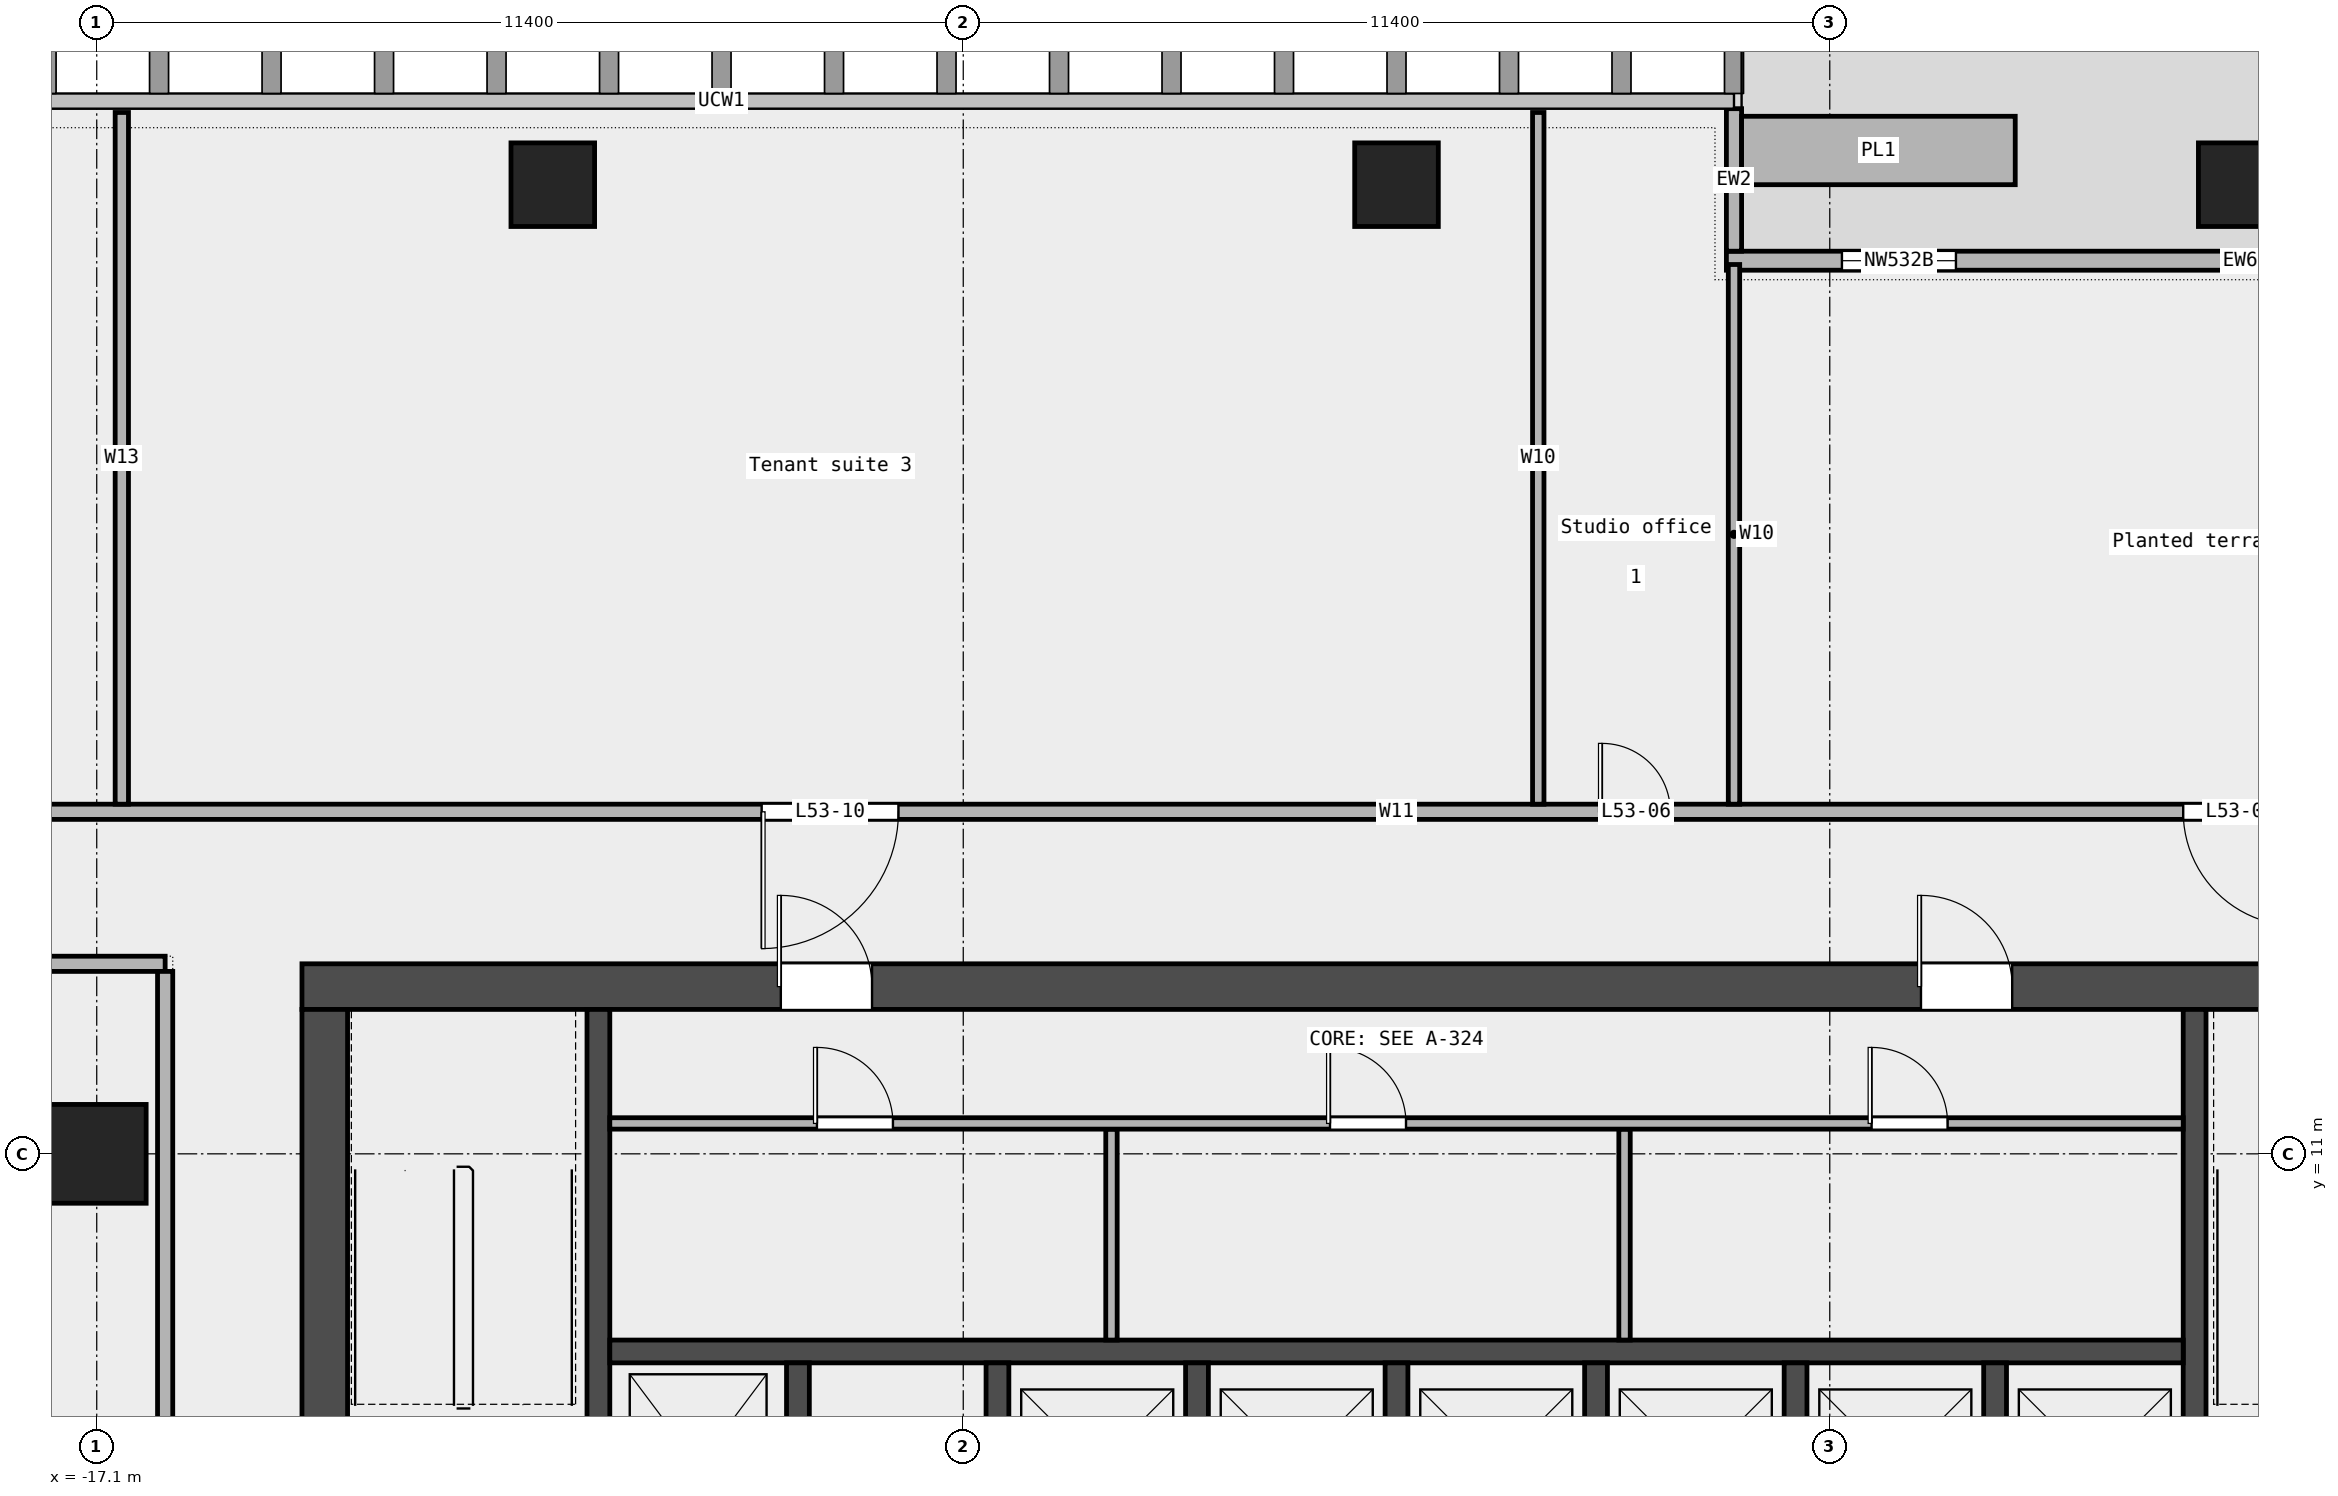
"""IFC4 building model, lengths in metres.
Left out: names, types, materials, properties, quantities, classifications, styles, units other than length and angle.
Written with IfcOpenShell. Run it as: python <this file> out.ifc"""

import sys

from ifc_helpers import new_model, si_unit, direction, frame, frame_2d, origin, origin_2d, place, context, subcontext, project, spatial, rectangle, extrude, element, fill, save


model = new_model("IFC4")
c1 = context("Model", 3, precision=1e-05, world=origin(), true_north=direction((0.0, 1.0)))
c2 = subcontext(c1, "Body", "Model", "MODEL_VIEW")
j1 = project(units=[si_unit("LENGTHUNIT", "METRE"), si_unit("PLANEANGLEUNIT", "RADIAN")], contexts=[c1])
p1 = place(None, origin())
s1 = spatial("IfcSite", under=j1, at=p1, CompositionType="ELEMENT")
p2 = place(p1, origin())
s2 = spatial("IfcBuilding", under=s1, at=p2, CompositionType="ELEMENT")
p3 = place(p2, frame((0.0, 0.0, 247.0)))
s3 = spatial("IfcBuildingStorey", under=s2, at=p3, CompositionType="ELEMENT", Elevation=247.0)
for number, where, z_axis, x_axis in (
    (1, (11.1, 23.75, 0.0), (0.0, 0.0, 1.0), (1.0, 0.0, 0.0)),
    (2, (0.0, 23.75, 0.0), (0.0, 0.0, 1.0), (1.0, 0.0, 0.0)),
    (3, (-11.1, 23.75, 0.0), (0.0, 0.0, 1.0), (1.0, 0.0, 0.0)),
):
    element("IfcColumn", number, at=place(p3, frame(where, z_axis=z_axis, x_axis=x_axis)), inside=s3, PredefinedType="COLUMN", context=c2, shape_type="SweptSolid", body=[
        extrude(rectangle(XDim=1.1, YDim=1.1, at=origin_2d()), origin(), (0.0, 0.0, 1.0), 3.6),
    ])
p4 = place(p3, frame((-17.1, 11.0, 0.0), z_axis=(0.0, 0.0, 1.0), x_axis=(1.0, 0.0, 0.0)))
e4 = element("IfcColumn", 4, at=p4, inside=s3, PredefinedType="COLUMN", context=c2, shape_type="SweptSolid", body=[
    extrude(rectangle(XDim=1.3, YDim=1.3, at=origin_2d()), origin(), (0.0, 0.0, 1.0), 3.6),
])
p5 = place(p3, frame((17.86, 22.75, 0.0), z_axis=(0.0, 0.0, 1.0), x_axis=(-1.0, 0.0, 0.0)))
e5 = element("IfcWall", 5, at=p5, inside=s3, PredefinedType="STANDARD", context=c2, shape_type="SweptSolid", body=[
    extrude(rectangle(XDim=13.52, YDim=0.25, at=frame_2d((6.76, 0.0))), origin(), (0.0, 0.0, 1.0), 3.6),
])
p6 = place(p5, frame((1.5, 0.0, 0.45)))
e6 = element("IfcOpeningElement", 6, at=p6, cuts=e5, PredefinedType="OPENING", context=c2, shape_type="SweptSolid", body=[
    extrude(rectangle(XDim=1.5, YDim=2.4, at=frame_2d((0.75, 1.2))), frame((0.0, 0.137, 0.0), z_axis=(0.0, -1.0, 0.0), x_axis=(1.0, 0.0, 0.0)), (0.0, 0.0, 1.0), 0.274),
])
p7 = place(p5, frame((4.0, 0.0, 0.0)))
e7 = element("IfcOpeningElement", 7, at=p7, cuts=e5, PredefinedType="OPENING", context=c2, shape_type="SweptSolid", body=[
    extrude(rectangle(XDim=1.8, YDim=2.4, at=frame_2d((0.9, 1.2))), frame((0.0, 0.137, 0.0), z_axis=(0.0, -1.0, 0.0), x_axis=(1.0, 0.0, 0.0)), (0.0, 0.0, 1.0), 0.274),
])
p8 = place(p5, frame((10.5, 0.0, 0.45)))
e8 = element("IfcOpeningElement", 8, at=p8, cuts=e5, PredefinedType="OPENING", context=c2, shape_type="SweptSolid", body=[
    extrude(rectangle(XDim=1.5, YDim=2.4, at=frame_2d((0.75, 1.2))), frame((0.0, 0.137, 0.0), z_axis=(0.0, -1.0, 0.0), x_axis=(1.0, 0.0, 0.0)), (0.0, 0.0, 1.0), 0.274),
])
p9 = place(p3, frame((4.44, 24.75, 0.0), z_axis=(0.0, 0.0, 1.0), x_axis=(0.0, -1.0, 0.0)))
e9 = element("IfcWall", 9, at=p9, inside=s3, PredefinedType="STANDARD", context=c2, shape_type="SweptSolid", body=[
    extrude(rectangle(XDim=1.875, YDim=0.2, at=frame_2d((0.938, 0.0))), origin(), (0.0, 0.0, 1.0), 3.6),
])
p10 = place(p3, frame((8.14, 24.2, 0.0), z_axis=(0.0, 0.0, 1.0), x_axis=(-1.0, 0.0, 0.0)))
e10 = element("IfcWall", 10, at=p10, inside=s3, PredefinedType="STANDARD", context=c2, shape_type="SweptSolid", body=[
    extrude(rectangle(XDim=3.6, YDim=0.9, at=frame_2d((1.8, 0.0))), origin(), (0.0, 0.0, 1.0), 0.7),
])
p11 = place(p3, frame((-26.15, 13.5, 0.0), z_axis=(0.0, 0.0, 1.0), x_axis=(1.0, 0.0, 0.0)))
e11 = element("IfcWall", 11, at=p11, inside=s3, PredefinedType="PARTITIONING", context=c2, shape_type="SweptSolid", body=[
    extrude(rectangle(XDim=9.95, YDim=0.2, at=frame_2d((4.975, 0.0))), origin(), (0.0, 0.0, 1.0), 3.6),
])
p12 = place(p3, frame((-28.15, 15.5, 0.0), z_axis=(0.0, 0.0, 1.0), x_axis=(1.0, 0.0, 0.0)))
e12 = element("IfcWall", 12, at=p12, inside=s3, PredefinedType="PARTITIONING", context=c2, shape_type="SweptSolid", body=[
    extrude(rectangle(XDim=56.3, YDim=0.2, at=frame_2d((28.15, 0.0))), origin(), (0.0, 0.0, 1.0), 3.6),
])
p13 = place(p12, frame((50.405, 0.0, 0.0)))
e13 = element("IfcOpeningElement", 13, at=p13, cuts=e12, PredefinedType="OPENING", context=c2, shape_type="SweptSolid", body=[
    extrude(rectangle(XDim=1.2, YDim=2.1, at=frame_2d((0.6, 1.05))), frame((0.0, 0.112, 0.0), z_axis=(0.0, -1.0, 0.0), x_axis=(1.0, 0.0, 0.0)), (0.0, 0.0, 1.0), 0.224),
])
p14 = place(p12, frame((38.5, 0.0, 0.0)))
e14 = element("IfcOpeningElement", 14, at=p14, cuts=e12, PredefinedType="OPENING", context=c2, shape_type="SweptSolid", body=[
    extrude(rectangle(XDim=1.5, YDim=2.1, at=frame_2d((0.75, 1.05))), frame((0.0, 0.112, 0.0), z_axis=(0.0, -1.0, 0.0), x_axis=(1.0, 0.0, 0.0)), (0.0, 0.0, 1.0), 0.224),
])
p15 = place(p12, frame((30.853, 0.0, 0.0)))
e15 = element("IfcOpeningElement", 15, at=p15, cuts=e12, PredefinedType="OPENING", context=c2, shape_type="SweptSolid", body=[
    extrude(rectangle(XDim=0.9, YDim=2.1, at=frame_2d((0.45, 1.05))), frame((0.0, 0.112, 0.0), z_axis=(0.0, -1.0, 0.0), x_axis=(1.0, 0.0, 0.0)), (0.0, 0.0, 1.0), 0.224),
])
p16 = place(p12, frame((19.798, 0.0, 0.0)))
e16 = element("IfcOpeningElement", 16, at=p16, cuts=e12, PredefinedType="OPENING", context=c2, shape_type="SweptSolid", body=[
    extrude(rectangle(XDim=1.8, YDim=2.1, at=frame_2d((0.9, 1.05))), frame((0.0, 0.112, 0.0), z_axis=(0.0, -1.0, 0.0), x_axis=(1.0, 0.0, 0.0)), (0.0, 0.0, 1.0), 0.224),
])
p17 = place(p12, frame((5.04, 0.0, 0.0)))
e17 = element("IfcOpeningElement", 17, at=p17, cuts=e12, PredefinedType="OPENING", context=c2, shape_type="SweptSolid", body=[
    extrude(rectangle(XDim=1.5, YDim=2.1, at=frame_2d((0.75, 1.05))), frame((0.0, 0.112, 0.0), z_axis=(0.0, -1.0, 0.0), x_axis=(1.0, 0.0, 0.0)), (0.0, 0.0, 1.0), 0.224),
])
p18 = place(p3, frame((-16.77, 15.6, 0.0), z_axis=(0.0, 0.0, 1.0), x_axis=(0.0, 1.0, 0.0)))
e18 = element("IfcWall", 18, at=p18, inside=s3, PredefinedType="PARTITIONING", context=c2, shape_type="SweptSolid", body=[
    extrude(rectangle(XDim=9.1, YDim=0.175, at=frame_2d((4.55, 0.0))), origin(), (0.0, 0.0, 1.0), 3.6),
])
p19 = place(p3, frame((-16.2, -7.1, 0.0), z_axis=(0.0, 0.0, 1.0), x_axis=(0.0, 1.0, 0.0)))
e19 = element("IfcWall", 19, at=p19, inside=s3, PredefinedType="PARTITIONING", context=c2, shape_type="SweptSolid", body=[
    extrude(rectangle(XDim=20.5, YDim=0.2, at=frame_2d((10.25, 0.0))), origin(), (0.0, 0.0, 1.0), 3.6),
])
p20 = place(p19, frame((13.05, 0.0, 0.0)))
e20 = element("IfcOpeningElement", 20, at=p20, cuts=e19, PredefinedType="OPENING", context=c2, shape_type="SweptSolid", body=[
    extrude(rectangle(XDim=1.5, YDim=2.1, at=frame_2d((0.75, 1.05))), frame((0.0, 0.112, 0.0), z_axis=(0.0, -1.0, 0.0), x_axis=(1.0, 0.0, 0.0)), (0.0, 0.0, 1.0), 0.224),
])
p21 = place(p3, frame((1.865, 15.6, 0.0), z_axis=(0.0, 0.0, 1.0), x_axis=(0.0, 1.0, 0.0)))
e21 = element("IfcWall", 21, at=p21, inside=s3, PredefinedType="PARTITIONING", context=c2, shape_type="SweptSolid", body=[
    extrude(rectangle(XDim=9.1, YDim=0.15, at=frame_2d((4.55, 0.0))), origin(), (0.0, 0.0, 1.0), 3.6),
])
p22 = place(p3, frame((4.44, 15.6, 0.0), z_axis=(0.0, 0.0, 1.0), x_axis=(0.0, 1.0, 0.0)))
e22 = element("IfcWall", 22, at=p22, inside=s3, PredefinedType="PARTITIONING", context=c2, shape_type="SweptSolid", body=[
    extrude(rectangle(XDim=7.1, YDim=0.15, at=frame_2d((3.55, 0.0))), origin(), (0.0, 0.0, 1.0), 3.6),
])
p23 = place(p3, frame((-14.4, 13.2, 0.0), z_axis=(0.0, 0.0, 1.0), x_axis=(1.0, 0.0, 0.0)))
e23 = element("IfcWall", 23, at=p23, inside=s3, PredefinedType="SHEAR", context=c2, shape_type="SweptSolid", body=[
    extrude(rectangle(XDim=28.8, YDim=0.6, at=frame_2d((14.4, 0.0))), origin(), (0.0, 0.0, 1.0), 3.7),
])
p24 = place(p23, frame((6.3, 0.0, 0.0)))
e24 = element("IfcOpeningElement", 24, at=p24, cuts=e23, PredefinedType="OPENING", context=c2, shape_type="SweptSolid", body=[
    extrude(rectangle(XDim=1.2, YDim=2.1, at=frame_2d((0.6, 1.05))), frame((0.0, 0.312, 0.0), z_axis=(0.0, -1.0, 0.0), x_axis=(1.0, 0.0, 0.0)), (0.0, 0.0, 1.0), 0.624),
])
p25 = place(p23, frame((21.3, 0.0, 0.0)))
e25 = element("IfcOpeningElement", 25, at=p25, cuts=e23, PredefinedType="OPENING", context=c2, shape_type="SweptSolid", body=[
    extrude(rectangle(XDim=1.2, YDim=2.1, at=frame_2d((0.6, 1.05))), frame((0.0, 0.312, 0.0), z_axis=(0.0, -1.0, 0.0), x_axis=(1.0, 0.0, 0.0)), (0.0, 0.0, 1.0), 0.624),
])
p26 = place(p3, frame((-14.1, -6.6, 0.0), z_axis=(0.0, 0.0, 1.0), x_axis=(0.0, 1.0, 0.0)))
e26 = element("IfcWall", 26, at=p26, inside=s3, PredefinedType="SHEAR", context=c2, shape_type="SweptSolid", body=[
    extrude(rectangle(XDim=19.5, YDim=0.6, at=frame_2d((9.75, 0.0))), origin(), (0.0, 0.0, 1.0), 3.7),
])
p27 = place(p26, frame((9.3, 0.0, 0.0)))
e27 = element("IfcOpeningElement", 27, at=p27, cuts=e26, PredefinedType="OPENING", context=c2, shape_type="SweptSolid", body=[
    extrude(rectangle(XDim=1.8, YDim=2.1, at=frame_2d((0.9, 1.05))), frame((0.0, 0.312, 0.0), z_axis=(0.0, -1.0, 0.0), x_axis=(1.0, 0.0, 0.0)), (0.0, 0.0, 1.0), 0.624),
])
for number, where, z_axis, x_axis in (
    (28, (-10.5, 5.25, 0.0), (0.0, 0.0, 1.0), (0.0, 1.0, 0.0)),
    (29, (10.5, 5.25, 0.0), (0.0, 0.0, 1.0), (0.0, 1.0, 0.0)),
):
    element("IfcWall", number, at=place(p3, frame(where, z_axis=z_axis, x_axis=x_axis)), inside=s3, PredefinedType="SHEAR", context=c2, shape_type="SweptSolid", body=[
        extrude(rectangle(XDim=7.65, YDim=0.3, at=frame_2d((3.825, 0.0))), origin(), (0.0, 0.0, 1.0), 3.7),
    ])
p28 = place(p3, frame((-10.35, 8.4, 0.0), z_axis=(0.0, 0.0, 1.0), x_axis=(1.0, 0.0, 0.0)))
e30 = element("IfcWall", 30, at=p28, inside=s3, PredefinedType="SOLIDWALL", context=c2, shape_type="SweptSolid", body=[
    extrude(rectangle(XDim=20.7, YDim=0.3, at=frame_2d((10.35, 0.0))), origin(), (0.0, 0.0, 1.0), 3.7),
])
for number, where, z_axis, x_axis in (
    (31, (-7.875, 5.55, 0.0), (0.0, 0.0, 1.0), (0.0, 1.0, 0.0)),
    (32, (-5.25, 5.55, 0.0), (0.0, 0.0, 1.0), (0.0, 1.0, 0.0)),
    (33, (-2.625, 5.55, 0.0), (0.0, 0.0, 1.0), (0.0, 1.0, 0.0)),
    (34, (0.0, 5.55, 0.0), (0.0, 0.0, 1.0), (0.0, 1.0, 0.0)),
    (35, (2.625, 5.55, 0.0), (0.0, 0.0, 1.0), (0.0, 1.0, 0.0)),
    (36, (5.25, 5.55, 0.0), (0.0, 0.0, 1.0), (0.0, 1.0, 0.0)),
    (37, (7.875, 5.55, 0.0), (0.0, 0.0, 1.0), (0.0, 1.0, 0.0)),
):
    element("IfcWall", number, at=place(p3, frame(where, z_axis=z_axis, x_axis=x_axis)), inside=s3, PredefinedType="SOLIDWALL", context=c2, shape_type="SweptSolid", body=[
        extrude(rectangle(XDim=2.7, YDim=0.3, at=frame_2d((1.35, 0.0))), origin(), (0.0, 0.0, 1.0), 3.7),
    ])
for number, where, z_axis, x_axis in (
    (38, (-3.75, 8.55, 0.0), (0.0, 0.0, 1.0), (0.0, 1.0, 0.0)),
    (39, (3.0, 8.55, 0.0), (0.0, 0.0, 1.0), (0.0, 1.0, 0.0)),
):
    element("IfcWall", number, at=place(p3, frame(where, z_axis=z_axis, x_axis=x_axis)), inside=s3, PredefinedType="PARTITIONING", context=c2, shape_type="SweptSolid", body=[
        extrude(rectangle(XDim=2.775, YDim=0.15, at=frame_2d((1.387, 0.0))), origin(), (0.0, 0.0, 1.0), 3.7),
    ])
p29 = place(p3, frame((-10.35, 11.4, 0.0), z_axis=(0.0, 0.0, 1.0), x_axis=(1.0, 0.0, 0.0)))
e40 = element("IfcWall", 40, at=p29, inside=s3, PredefinedType="PARTITIONING", context=c2, shape_type="SweptSolid", body=[
    extrude(rectangle(XDim=20.7, YDim=0.15, at=frame_2d((10.35, 0.0))), origin(), (0.0, 0.0, 1.0), 3.7),
])
p30 = place(p29, frame((2.725, 0.0, 0.0)))
e41 = element("IfcOpeningElement", 41, at=p30, cuts=e40, PredefinedType="OPENING", context=c2, shape_type="SweptSolid", body=[
    extrude(rectangle(XDim=1.0, YDim=2.1, at=frame_2d((0.5, 1.05))), frame((0.0, 0.087, 0.0), z_axis=(0.0, -1.0, 0.0), x_axis=(1.0, 0.0, 0.0)), (0.0, 0.0, 1.0), 0.174),
])
p31 = place(p29, frame((9.475, 0.0, 0.0)))
e42 = element("IfcOpeningElement", 42, at=p31, cuts=e40, PredefinedType="OPENING", context=c2, shape_type="SweptSolid", body=[
    extrude(rectangle(XDim=1.0, YDim=2.1, at=frame_2d((0.5, 1.05))), frame((0.0, 0.087, 0.0), z_axis=(0.0, -1.0, 0.0), x_axis=(1.0, 0.0, 0.0)), (0.0, 0.0, 1.0), 0.174),
])
p32 = place(p29, frame((16.6, 0.0, 0.0)))
e43 = element("IfcOpeningElement", 43, at=p32, cuts=e40, PredefinedType="OPENING", context=c2, shape_type="SweptSolid", body=[
    extrude(rectangle(XDim=1.0, YDim=2.1, at=frame_2d((0.5, 1.05))), frame((0.0, 0.087, 0.0), z_axis=(0.0, -1.0, 0.0), x_axis=(1.0, 0.0, 0.0)), (0.0, 0.0, 1.0), 0.174),
])
p33 = place(p8, origin())
e44 = element("IfcWindow", 44, at=p33, inside=s3, PartitioningType="SINGLE_PANEL", PredefinedType="WINDOW", context=c2, shape_type="SweptSolid", body=[
    extrude(rectangle(XDim=1.5, YDim=2.4, at=frame_2d((0.75, 1.2))), frame((0.0, 0.03, 0.0), z_axis=(0.0, -1.0, 0.0), x_axis=(1.0, 0.0, 0.0)), (0.0, 0.0, 1.0), 0.06),
])
fill(e8, e44)
p34 = place(p14, origin())
e45 = element("IfcDoor", 45, at=p34, inside=s3, OperationType="DOUBLE_DOOR_SINGLE_SWING", PredefinedType="DOOR", context=c2, shape_type="SweptSolid", body=[
    extrude(rectangle(XDim=1.5, YDim=2.1, at=frame_2d((0.75, 1.05))), frame((0.0, 0.025, 0.0), z_axis=(0.0, -1.0, 0.0), x_axis=(1.0, 0.0, 0.0)), (0.0, 0.0, 1.0), 0.05),
])
fill(e14, e45)
p35 = place(p15, origin())
e46 = element("IfcDoor", 46, at=p35, inside=s3, OperationType="SINGLE_SWING_LEFT", PredefinedType="DOOR", context=c2, shape_type="SweptSolid", body=[
    extrude(rectangle(XDim=0.9, YDim=2.1, at=frame_2d((0.45, 1.05))), frame((0.0, 0.025, 0.0), z_axis=(0.0, -1.0, 0.0), x_axis=(1.0, 0.0, 0.0)), (0.0, 0.0, 1.0), 0.05),
])
fill(e15, e46)
p36 = place(p16, origin())
e47 = element("IfcDoor", 47, at=p36, inside=s3, OperationType="DOUBLE_DOOR_SINGLE_SWING", PredefinedType="DOOR", context=c2, shape_type="SweptSolid", body=[
    extrude(rectangle(XDim=1.8, YDim=2.1, at=frame_2d((0.9, 1.05))), frame((0.0, 0.025, 0.0), z_axis=(0.0, -1.0, 0.0), x_axis=(1.0, 0.0, 0.0)), (0.0, 0.0, 1.0), 0.05),
])
fill(e16, e47)
p37 = place(p30, origin())
e48 = element("IfcDoor", 48, at=p37, inside=s3, OperationType="SINGLE_SWING_LEFT", PredefinedType="DOOR", context=c2, shape_type="SweptSolid", body=[
    extrude(rectangle(XDim=1.0, YDim=2.1, at=frame_2d((0.5, 1.05))), frame((0.0, 0.025, 0.0), z_axis=(0.0, -1.0, 0.0), x_axis=(1.0, 0.0, 0.0)), (0.0, 0.0, 1.0), 0.05),
])
fill(e41, e48)
p38 = place(p31, origin())
e49 = element("IfcDoor", 49, at=p38, inside=s3, OperationType="SINGLE_SWING_LEFT", PredefinedType="DOOR", context=c2, shape_type="SweptSolid", body=[
    extrude(rectangle(XDim=1.0, YDim=2.1, at=frame_2d((0.5, 1.05))), frame((0.0, 0.025, 0.0), z_axis=(0.0, -1.0, 0.0), x_axis=(1.0, 0.0, 0.0)), (0.0, 0.0, 1.0), 0.05),
])
fill(e42, e49)
p39 = place(p32, origin())
e50 = element("IfcDoor", 50, at=p39, inside=s3, OperationType="SINGLE_SWING_LEFT", PredefinedType="DOOR", context=c2, shape_type="SweptSolid", body=[
    extrude(rectangle(XDim=1.0, YDim=2.1, at=frame_2d((0.5, 1.05))), frame((0.0, 0.025, 0.0), z_axis=(0.0, -1.0, 0.0), x_axis=(1.0, 0.0, 0.0)), (0.0, 0.0, 1.0), 0.05),
])
fill(e43, e50)
p40 = place(p24, origin())
e51 = element("IfcDoor", 51, at=p40, inside=s3, OperationType="SINGLE_SWING_LEFT", PredefinedType="DOOR", context=c2, shape_type="SweptSolid", body=[
    extrude(rectangle(XDim=1.2, YDim=2.1, at=frame_2d((0.6, 1.05))), frame((0.0, 0.025, 0.0), z_axis=(0.0, -1.0, 0.0), x_axis=(1.0, 0.0, 0.0)), (0.0, 0.0, 1.0), 0.05),
])
fill(e24, e51)
p41 = place(p25, origin())
e52 = element("IfcDoor", 52, at=p41, inside=s3, OperationType="SINGLE_SWING_RIGHT", PredefinedType="DOOR", context=c2, shape_type="SweptSolid", body=[
    extrude(rectangle(XDim=1.2, YDim=2.1, at=frame_2d((0.6, 1.05))), frame((0.0, 0.025, 0.0), z_axis=(0.0, -1.0, 0.0), x_axis=(1.0, 0.0, 0.0)), (0.0, 0.0, 1.0), 0.05),
])
fill(e25, e52)
save(model, sys.argv[1])
